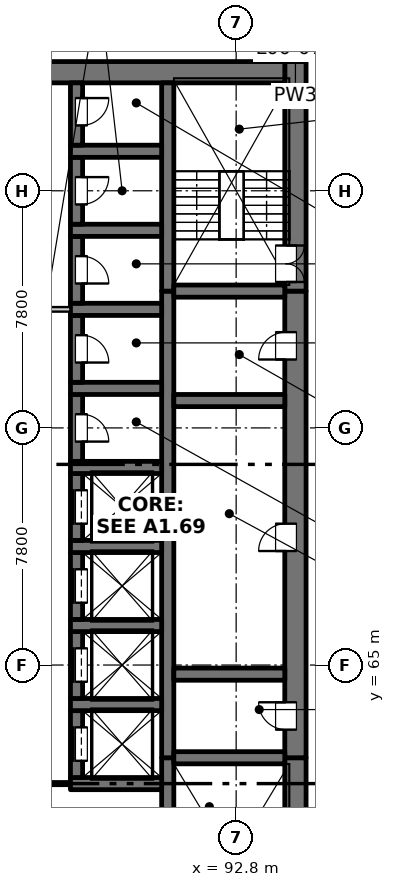
"""IFC4 building model, lengths in metres.
Left out: names, types, materials, properties, quantities, classifications, styles, units other than length and angle.
Written with IfcOpenShell. Run it as: python <this file> out.ifc"""

import sys

from ifc_helpers import new_model, si_unit, direction, frame, frame_2d, origin, place, context, subcontext, project, spatial, rectangle, extrude, element, fill, save


model = new_model("IFC4")
c1 = context("Model", 3, precision=1e-05, world=origin(), true_north=direction((0.0, 1.0)))
c2 = subcontext(c1, "Body", "Model", "MODEL_VIEW")
j1 = project(units=[si_unit("LENGTHUNIT", "METRE"), si_unit("PLANEANGLEUNIT", "RADIAN")], contexts=[c1])
p1 = place(None, origin())
s1 = spatial("IfcSite", under=j1, at=p1, CompositionType="ELEMENT")
p2 = place(p1, origin())
s2 = spatial("IfcBuilding", under=s1, at=p2, CompositionType="ELEMENT")
p3 = place(p2, origin())
s3 = spatial("IfcBuildingStorey", under=s2, at=p3, CompositionType="ELEMENT", Elevation=0.0)
p4 = place(p3, frame((94.75, 54.9, -0.4), z_axis=(0.0, 0.0, 1.0), x_axis=(0.0, 1.0, 0.0)))
e1 = element("IfcWall", 1, at=p4, inside=s3, PredefinedType="SOLIDWALL", context=c2, shape_type="SweptSolid", body=[
    extrude(rectangle(XDim=7.05, YDim=0.7, at=frame_2d((3.525, 0.0))), origin(), (0.0, 0.0, 1.0), 6.1),
])
p5 = place(p4, frame((0.75, 0.0, 0.4)))
e2 = element("IfcOpeningElement", 2, at=p5, cuts=e1, PredefinedType="OPENING", context=c2, shape_type="SweptSolid", body=[
    extrude(rectangle(XDim=1.2, YDim=2.1, at=frame_2d((0.6, 1.05))), frame((0.0, 0.36, 0.0), z_axis=(0.0, -1.0, 0.0), x_axis=(1.0, 0.0, 0.0)), (0.0, 0.0, 1.0), 0.72),
])
p6 = place(p3, frame((94.75, 61.95, -0.4), z_axis=(0.0, 0.0, 1.0), x_axis=(0.0, 1.0, 0.0)))
e3 = element("IfcWall", 3, at=p6, inside=s3, PredefinedType="SOLIDWALL", context=c2, shape_type="SweptSolid", body=[
    extrude(rectangle(XDim=15.35, YDim=0.7, at=frame_2d((7.675, 0.0))), origin(), (0.0, 0.0, 1.0), 6.1),
])
p7 = place(p6, frame((0.925, 0.0, 0.4)))
e4 = element("IfcOpeningElement", 4, at=p7, cuts=e3, PredefinedType="OPENING", context=c2, shape_type="SweptSolid", body=[
    extrude(rectangle(XDim=0.9, YDim=2.1, at=frame_2d((0.45, 1.05))), frame((0.0, 0.36, 0.0), z_axis=(0.0, -1.0, 0.0), x_axis=(1.0, 0.0, 0.0)), (0.0, 0.0, 1.0), 0.72),
])
p8 = place(p6, frame((6.8, 0.0, 0.4)))
e5 = element("IfcOpeningElement", 5, at=p8, cuts=e3, PredefinedType="OPENING", context=c2, shape_type="SweptSolid", body=[
    extrude(rectangle(XDim=0.9, YDim=2.1, at=frame_2d((0.45, 1.05))), frame((0.0, 0.36, 0.0), z_axis=(0.0, -1.0, 0.0), x_axis=(1.0, 0.0, 0.0)), (0.0, 0.0, 1.0), 0.72),
])
p9 = place(p6, frame((13.1, 0.0, 0.4)))
e6 = element("IfcOpeningElement", 6, at=p9, cuts=e3, PredefinedType="OPENING", context=c2, shape_type="SweptSolid", body=[
    extrude(rectangle(XDim=0.9, YDim=2.1, at=frame_2d((0.45, 1.05))), frame((0.0, 0.36, 0.0), z_axis=(0.0, -1.0, 0.0), x_axis=(1.0, 0.0, 0.0)), (0.0, 0.0, 1.0), 0.72),
])
p10 = place(p3, frame((94.75, 77.3, -0.4), z_axis=(0.0, 0.0, 1.0), x_axis=(0.0, 1.0, 0.0)))
e7 = element("IfcWall", 7, at=p10, inside=s3, PredefinedType="SOLIDWALL", context=c2, shape_type="SweptSolid", body=[
    extrude(rectangle(XDim=7.55, YDim=0.7, at=frame_2d((3.775, 0.0))), origin(), (0.0, 0.0, 1.0), 6.1),
])
p11 = place(p10, frame((0.3, 0.0, 0.4)))
e8 = element("IfcOpeningElement", 8, at=p11, cuts=e7, PredefinedType="OPENING", context=c2, shape_type="SweptSolid", body=[
    extrude(rectangle(XDim=1.2, YDim=2.1, at=frame_2d((0.6, 1.05))), frame((0.0, 0.36, 0.0), z_axis=(0.0, -1.0, 0.0), x_axis=(1.0, 0.0, 0.0)), (0.0, 0.0, 1.0), 0.72),
])
p12 = place(p3, frame((75.6, 84.5, -0.4), z_axis=(0.0, 0.0, 1.0), x_axis=(1.0, 0.0, 0.0)))
e9 = element("IfcWall", 9, at=p12, inside=s3, PredefinedType="SOLIDWALL", context=c2, shape_type="SweptSolid", body=[
    extrude(rectangle(XDim=18.8, YDim=0.7, at=frame_2d((9.4, 0.0))), origin(), (0.0, 0.0, 1.0), 6.1),
])
p13 = place(p3, frame((90.55, 55.6, -0.4), z_axis=(0.0, 0.0, 1.0), x_axis=(0.0, 1.0, 0.0)))
e10 = element("IfcWall", 10, at=p13, inside=s3, PredefinedType="SOLIDWALL", context=c2, shape_type="SweptSolid", body=[
    extrude(rectangle(XDim=6.35, YDim=0.4, at=frame_2d((3.175, 0.0))), origin(), (0.0, 0.0, 1.0), 6.1),
])
p14 = place(p13, frame((0.1, 0.0, 0.4)))
e11 = element("IfcOpeningElement", 11, at=p14, cuts=e10, PredefinedType="OPENING", context=c2, shape_type="SweptSolid", body=[
    extrude(rectangle(XDim=1.2, YDim=2.1, at=frame_2d((0.6, 1.05))), frame((0.0, 0.21, 0.0), z_axis=(0.0, -1.0, 0.0), x_axis=(1.0, 0.0, 0.0)), (0.0, 0.0, 1.0), 0.42),
])
p15 = place(p3, frame((90.55, 61.95, -0.4), z_axis=(0.0, 0.0, 1.0), x_axis=(0.0, 1.0, 0.0)))
e12 = element("IfcWall", 12, at=p15, inside=s3, PredefinedType="SOLIDWALL", context=c2, shape_type="SweptSolid", body=[
    extrude(rectangle(XDim=15.35, YDim=0.4, at=frame_2d((7.675, 0.0))), origin(), (0.0, 0.0, 1.0), 6.1),
])
p16 = place(p3, frame((90.55, 77.3, -0.4), z_axis=(0.0, 0.0, 1.0), x_axis=(0.0, 1.0, 0.0)))
e13 = element("IfcWall", 13, at=p16, inside=s3, PredefinedType="SOLIDWALL", context=c2, shape_type="SweptSolid", body=[
    extrude(rectangle(XDim=6.85, YDim=0.4, at=frame_2d((3.425, 0.0))), origin(), (0.0, 0.0, 1.0), 6.1),
])
p17 = place(p3, frame((87.35, 61.1, -0.4), z_axis=(0.0, 0.0, 1.0), x_axis=(1.0, 0.0, 0.0)))
e14 = element("IfcWall", 14, at=p17, inside=s3, PredefinedType="SOLIDWALL", context=c2, shape_type="SweptSolid", body=[
    extrude(rectangle(XDim=3.0, YDim=0.4, at=frame_2d((1.5, 0.0))), origin(), (0.0, 0.0, 1.0), 6.1),
])
p18 = place(p3, frame((87.55, 61.3, -0.4), z_axis=(0.0, 0.0, 1.0), x_axis=(0.0, 1.0, 0.0)))
e15 = element("IfcWall", 15, at=p18, inside=s3, PredefinedType="SOLIDWALL", context=c2, shape_type="SweptSolid", body=[
    extrude(rectangle(XDim=2.2, YDim=0.4, at=frame_2d((1.1, 0.0))), origin(), (0.0, 0.0, 1.0), 6.1),
])
p19 = place(p18, frame((0.55, 0.0, 0.4)))
e16 = element("IfcOpeningElement", 16, at=p19, cuts=e15, PredefinedType="OPENING", context=c2, shape_type="SweptSolid", body=[
    extrude(rectangle(XDim=1.1, YDim=2.1, at=frame_2d((0.55, 1.05))), frame((0.0, 0.21, 0.0), z_axis=(0.0, -1.0, 0.0), x_axis=(1.0, 0.0, 0.0)), (0.0, 0.0, 1.0), 0.42),
])
p20 = place(p3, frame((87.35, 63.7, -0.4), z_axis=(0.0, 0.0, 1.0), x_axis=(1.0, 0.0, 0.0)))
e17 = element("IfcWall", 17, at=p20, inside=s3, PredefinedType="SOLIDWALL", context=c2, shape_type="SweptSolid", body=[
    extrude(rectangle(XDim=3.0, YDim=0.4, at=frame_2d((1.5, 0.0))), origin(), (0.0, 0.0, 1.0), 6.1),
])
p21 = place(p3, frame((87.55, 63.9, -0.4), z_axis=(0.0, 0.0, 1.0), x_axis=(0.0, 1.0, 0.0)))
e18 = element("IfcWall", 18, at=p21, inside=s3, PredefinedType="SOLIDWALL", context=c2, shape_type="SweptSolid", body=[
    extrude(rectangle(XDim=2.2, YDim=0.4, at=frame_2d((1.1, 0.0))), origin(), (0.0, 0.0, 1.0), 6.1),
])
p22 = place(p21, frame((0.55, 0.0, 0.4)))
e19 = element("IfcOpeningElement", 19, at=p22, cuts=e18, PredefinedType="OPENING", context=c2, shape_type="SweptSolid", body=[
    extrude(rectangle(XDim=1.1, YDim=2.1, at=frame_2d((0.55, 1.05))), frame((0.0, 0.21, 0.0), z_axis=(0.0, -1.0, 0.0), x_axis=(1.0, 0.0, 0.0)), (0.0, 0.0, 1.0), 0.42),
])
p23 = place(p3, frame((87.35, 66.3, -0.4), z_axis=(0.0, 0.0, 1.0), x_axis=(1.0, 0.0, 0.0)))
e20 = element("IfcWall", 20, at=p23, inside=s3, PredefinedType="SOLIDWALL", context=c2, shape_type="SweptSolid", body=[
    extrude(rectangle(XDim=3.0, YDim=0.4, at=frame_2d((1.5, 0.0))), origin(), (0.0, 0.0, 1.0), 6.1),
])
p24 = place(p3, frame((87.55, 66.5, -0.4), z_axis=(0.0, 0.0, 1.0), x_axis=(0.0, 1.0, 0.0)))
e21 = element("IfcWall", 21, at=p24, inside=s3, PredefinedType="SOLIDWALL", context=c2, shape_type="SweptSolid", body=[
    extrude(rectangle(XDim=2.2, YDim=0.4, at=frame_2d((1.1, 0.0))), origin(), (0.0, 0.0, 1.0), 6.1),
])
p25 = place(p24, frame((0.55, 0.0, 0.4)))
e22 = element("IfcOpeningElement", 22, at=p25, cuts=e21, PredefinedType="OPENING", context=c2, shape_type="SweptSolid", body=[
    extrude(rectangle(XDim=1.1, YDim=2.1, at=frame_2d((0.55, 1.05))), frame((0.0, 0.21, 0.0), z_axis=(0.0, -1.0, 0.0), x_axis=(1.0, 0.0, 0.0)), (0.0, 0.0, 1.0), 0.42),
])
p26 = place(p3, frame((87.35, 68.9, -0.4), z_axis=(0.0, 0.0, 1.0), x_axis=(1.0, 0.0, 0.0)))
e23 = element("IfcWall", 23, at=p26, inside=s3, PredefinedType="SOLIDWALL", context=c2, shape_type="SweptSolid", body=[
    extrude(rectangle(XDim=3.0, YDim=0.4, at=frame_2d((1.5, 0.0))), origin(), (0.0, 0.0, 1.0), 6.1),
])
p27 = place(p3, frame((87.55, 69.1, -0.4), z_axis=(0.0, 0.0, 1.0), x_axis=(0.0, 1.0, 0.0)))
e24 = element("IfcWall", 24, at=p27, inside=s3, PredefinedType="SOLIDWALL", context=c2, shape_type="SweptSolid", body=[
    extrude(rectangle(XDim=2.2, YDim=0.4, at=frame_2d((1.1, 0.0))), origin(), (0.0, 0.0, 1.0), 6.1),
])
p28 = place(p27, frame((0.55, 0.0, 0.4)))
e25 = element("IfcOpeningElement", 25, at=p28, cuts=e24, PredefinedType="OPENING", context=c2, shape_type="SweptSolid", body=[
    extrude(rectangle(XDim=1.1, YDim=2.1, at=frame_2d((0.55, 1.05))), frame((0.0, 0.21, 0.0), z_axis=(0.0, -1.0, 0.0), x_axis=(1.0, 0.0, 0.0)), (0.0, 0.0, 1.0), 0.42),
])
p29 = place(p3, frame((87.35, 71.5, -0.4), z_axis=(0.0, 0.0, 1.0), x_axis=(1.0, 0.0, 0.0)))
e26 = element("IfcWall", 26, at=p29, inside=s3, PredefinedType="SOLIDWALL", context=c2, shape_type="SweptSolid", body=[
    extrude(rectangle(XDim=3.0, YDim=0.4, at=frame_2d((1.5, 0.0))), origin(), (0.0, 0.0, 1.0), 6.1),
])
p30 = place(p3, frame((87.55, 71.7, -0.4), z_axis=(0.0, 0.0, 1.0), x_axis=(0.0, 1.0, 0.0)))
e27 = element("IfcWall", 27, at=p30, inside=s3, PredefinedType="SOLIDWALL", context=c2, shape_type="SweptSolid", body=[
    extrude(rectangle(XDim=2.2, YDim=0.4, at=frame_2d((1.1, 0.0))), origin(), (0.0, 0.0, 1.0), 6.1),
])
p31 = place(p30, frame((0.65, 0.0, 0.4)))
e28 = element("IfcOpeningElement", 28, at=p31, cuts=e27, PredefinedType="OPENING", context=c2, shape_type="SweptSolid", body=[
    extrude(rectangle(XDim=0.9, YDim=2.1, at=frame_2d((0.45, 1.05))), frame((0.0, 0.21, 0.0), z_axis=(0.0, -1.0, 0.0), x_axis=(1.0, 0.0, 0.0)), (0.0, 0.0, 1.0), 0.42),
])
p32 = place(p3, frame((87.35, 74.1, -0.4), z_axis=(0.0, 0.0, 1.0), x_axis=(1.0, 0.0, 0.0)))
e29 = element("IfcWall", 29, at=p32, inside=s3, PredefinedType="SOLIDWALL", context=c2, shape_type="SweptSolid", body=[
    extrude(rectangle(XDim=3.0, YDim=0.4, at=frame_2d((1.5, 0.0))), origin(), (0.0, 0.0, 1.0), 6.1),
])
p33 = place(p3, frame((87.55, 74.3, -0.4), z_axis=(0.0, 0.0, 1.0), x_axis=(0.0, 1.0, 0.0)))
e30 = element("IfcWall", 30, at=p33, inside=s3, PredefinedType="SOLIDWALL", context=c2, shape_type="SweptSolid", body=[
    extrude(rectangle(XDim=2.2, YDim=0.4, at=frame_2d((1.1, 0.0))), origin(), (0.0, 0.0, 1.0), 6.1),
])
p34 = place(p33, frame((0.65, 0.0, 0.4)))
e31 = element("IfcOpeningElement", 31, at=p34, cuts=e30, PredefinedType="OPENING", context=c2, shape_type="SweptSolid", body=[
    extrude(rectangle(XDim=0.9, YDim=2.1, at=frame_2d((0.45, 1.05))), frame((0.0, 0.21, 0.0), z_axis=(0.0, -1.0, 0.0), x_axis=(1.0, 0.0, 0.0)), (0.0, 0.0, 1.0), 0.42),
])
p35 = place(p3, frame((87.35, 76.7, -0.4), z_axis=(0.0, 0.0, 1.0), x_axis=(1.0, 0.0, 0.0)))
e32 = element("IfcWall", 32, at=p35, inside=s3, PredefinedType="SOLIDWALL", context=c2, shape_type="SweptSolid", body=[
    extrude(rectangle(XDim=3.0, YDim=0.4, at=frame_2d((1.5, 0.0))), origin(), (0.0, 0.0, 1.0), 6.1),
])
p36 = place(p3, frame((87.55, 76.9, -0.4), z_axis=(0.0, 0.0, 1.0), x_axis=(0.0, 1.0, 0.0)))
e33 = element("IfcWall", 33, at=p36, inside=s3, PredefinedType="SOLIDWALL", context=c2, shape_type="SweptSolid", body=[
    extrude(rectangle(XDim=2.2, YDim=0.4, at=frame_2d((1.1, 0.0))), origin(), (0.0, 0.0, 1.0), 6.1),
])
p37 = place(p36, frame((0.65, 0.0, 0.4)))
e34 = element("IfcOpeningElement", 34, at=p37, cuts=e33, PredefinedType="OPENING", context=c2, shape_type="SweptSolid", body=[
    extrude(rectangle(XDim=0.9, YDim=2.1, at=frame_2d((0.45, 1.05))), frame((0.0, 0.21, 0.0), z_axis=(0.0, -1.0, 0.0), x_axis=(1.0, 0.0, 0.0)), (0.0, 0.0, 1.0), 0.42),
])
p38 = place(p3, frame((87.35, 79.3, -0.4), z_axis=(0.0, 0.0, 1.0), x_axis=(1.0, 0.0, 0.0)))
e35 = element("IfcWall", 35, at=p38, inside=s3, PredefinedType="SOLIDWALL", context=c2, shape_type="SweptSolid", body=[
    extrude(rectangle(XDim=3.0, YDim=0.4, at=frame_2d((1.5, 0.0))), origin(), (0.0, 0.0, 1.0), 6.1),
])
p39 = place(p3, frame((87.55, 79.5, -0.4), z_axis=(0.0, 0.0, 1.0), x_axis=(0.0, 1.0, 0.0)))
e36 = element("IfcWall", 36, at=p39, inside=s3, PredefinedType="SOLIDWALL", context=c2, shape_type="SweptSolid", body=[
    extrude(rectangle(XDim=2.2, YDim=0.4, at=frame_2d((1.1, 0.0))), origin(), (0.0, 0.0, 1.0), 6.1),
])
p40 = place(p39, frame((0.65, 0.0, 0.4)))
e37 = element("IfcOpeningElement", 37, at=p40, cuts=e36, PredefinedType="OPENING", context=c2, shape_type="SweptSolid", body=[
    extrude(rectangle(XDim=0.9, YDim=2.1, at=frame_2d((0.45, 1.05))), frame((0.0, 0.21, 0.0), z_axis=(0.0, -1.0, 0.0), x_axis=(1.0, 0.0, 0.0)), (0.0, 0.0, 1.0), 0.42),
])
p41 = place(p3, frame((87.35, 81.9, -0.4), z_axis=(0.0, 0.0, 1.0), x_axis=(1.0, 0.0, 0.0)))
e38 = element("IfcWall", 38, at=p41, inside=s3, PredefinedType="SOLIDWALL", context=c2, shape_type="SweptSolid", body=[
    extrude(rectangle(XDim=3.0, YDim=0.4, at=frame_2d((1.5, 0.0))), origin(), (0.0, 0.0, 1.0), 6.1),
])
p42 = place(p3, frame((87.55, 82.1, -0.4), z_axis=(0.0, 0.0, 1.0), x_axis=(0.0, 1.0, 0.0)))
e39 = element("IfcWall", 39, at=p42, inside=s3, PredefinedType="SOLIDWALL", context=c2, shape_type="SweptSolid", body=[
    extrude(rectangle(XDim=2.05, YDim=0.4, at=frame_2d((1.025, 0.0))), origin(), (0.0, 0.0, 1.0), 6.1),
])
p43 = place(p42, frame((0.65, 0.0, 0.4)))
e40 = element("IfcOpeningElement", 40, at=p43, cuts=e39, PredefinedType="OPENING", context=c2, shape_type="SweptSolid", body=[
    extrude(rectangle(XDim=0.9, YDim=2.1, at=frame_2d((0.45, 1.05))), frame((0.0, 0.21, 0.0), z_axis=(0.0, -1.0, 0.0), x_axis=(1.0, 0.0, 0.0)), (0.0, 0.0, 1.0), 0.42),
])
for number, where, z_axis, x_axis in (
    (41, (90.75, 61.95, -0.4), (0.0, 0.0, 1.0), (1.0, 0.0, 0.0)),
    (42, (90.75, 64.7, -0.4), (0.0, 0.0, 1.0), (1.0, 0.0, 0.0)),
    (43, (90.75, 73.7, -0.4), (0.0, 0.0, 1.0), (1.0, 0.0, 0.0)),
    (44, (90.75, 77.3, -0.4), (0.0, 0.0, 1.0), (1.0, 0.0, 0.0)),
):
    element("IfcWall", number, at=place(p3, frame(where, z_axis=z_axis, x_axis=x_axis)), inside=s3, PredefinedType="SOLIDWALL", context=c2, shape_type="SweptSolid", body=[
        extrude(rectangle(XDim=3.65, YDim=0.4, at=frame_2d((1.825, 0.0))), origin(), (0.0, 0.0, 1.0), 6.1),
    ])
p44 = place(p3, frame((82.65, 61.1, 0.0), z_axis=(0.0, 0.0, 1.0), x_axis=(1.0, 0.0, 0.0)))
e45 = element("IfcWall", 45, at=p44, inside=s3, PredefinedType="PARTITIONING", context=c2, shape_type="SweptSolid", body=[
    extrude(rectangle(XDim=4.7, YDim=0.15, at=frame_2d((2.35, 0.0))), origin(), (0.0, 0.0, 1.0), 5.7),
])
p45 = place(p44, frame((1.45, 0.0, 0.0)))
e46 = element("IfcOpeningElement", 46, at=p45, cuts=e45, PredefinedType="OPENING", context=c2, shape_type="SweptSolid", body=[
    extrude(rectangle(XDim=1.8, YDim=2.1, at=frame_2d((0.9, 1.05))), frame((0.0, 0.085, 0.0), z_axis=(0.0, -1.0, 0.0), x_axis=(1.0, 0.0, 0.0)), (0.0, 0.0, 1.0), 0.17),
])
p46 = place(p3, frame((82.65, 76.7, 0.0), z_axis=(0.0, 0.0, 1.0), x_axis=(1.0, 0.0, 0.0)))
e47 = element("IfcWall", 47, at=p46, inside=s3, PredefinedType="PARTITIONING", context=c2, shape_type="SweptSolid", body=[
    extrude(rectangle(XDim=4.7, YDim=0.15, at=frame_2d((2.35, 0.0))), origin(), (0.0, 0.0, 1.0), 5.7),
])
p47 = place(p46, frame((1.45, 0.0, 0.0)))
e48 = element("IfcOpeningElement", 48, at=p47, cuts=e47, PredefinedType="OPENING", context=c2, shape_type="SweptSolid", body=[
    extrude(rectangle(XDim=1.8, YDim=2.1, at=frame_2d((0.9, 1.05))), frame((0.0, 0.085, 0.0), z_axis=(0.0, -1.0, 0.0), x_axis=(1.0, 0.0, 0.0)), (0.0, 0.0, 1.0), 0.17),
])
p48 = place(p3, frame((94.75, 84.85, 0.0), z_axis=(0.0, 0.0, 1.0), x_axis=(0.0, 1.0, 0.0)))
e49 = element("IfcWall", 49, at=p48, inside=s3, PredefinedType="PARTITIONING", context=c2, shape_type="SweptSolid", body=[
    extrude(rectangle(XDim=3.25, YDim=0.2, at=frame_2d((1.625, 0.0))), origin(), (0.0, 0.0, 1.0), 5.7),
])
p49 = place(p48, frame((1.0, 0.0, 0.0)))
e50 = element("IfcOpeningElement", 50, at=p49, cuts=e49, PredefinedType="OPENING", context=c2, shape_type="SweptSolid", body=[
    extrude(rectangle(XDim=1.2, YDim=2.1, at=frame_2d((0.6, 1.05))), frame((0.0, 0.11, 0.0), z_axis=(0.0, -1.0, 0.0), x_axis=(1.0, 0.0, 0.0)), (0.0, 0.0, 1.0), 0.22),
])
p50 = place(p19, origin())
e51 = element("IfcDoor", 51, at=p50, inside=s3, OperationType="SLIDING_TO_RIGHT", PredefinedType="DOOR", context=c2, shape_type="SweptSolid", body=[
    extrude(rectangle(XDim=1.1, YDim=2.1, at=frame_2d((0.55, 1.05))), frame((0.0, -0.135, 0.0), z_axis=(0.0, -1.0, 0.0), x_axis=(1.0, 0.0, 0.0)), (0.0, 0.0, 1.0), 0.05),
])
fill(e16, e51)
p51 = place(p7, origin())
e52 = element("IfcDoor", 52, at=p51, inside=s3, OperationType="SINGLE_SWING_RIGHT", PredefinedType="DOOR", context=c2, shape_type="SweptSolid", body=[
    extrude(rectangle(XDim=0.9, YDim=2.1, at=frame_2d((0.45, 1.05))), frame((0.0, 0.335, 0.0), z_axis=(0.0, -1.0, 0.0), x_axis=(1.0, 0.0, 0.0)), (0.0, 0.0, 1.0), 0.05),
])
fill(e4, e52)
p52 = place(p22, origin())
e53 = element("IfcDoor", 53, at=p52, inside=s3, OperationType="SLIDING_TO_RIGHT", PredefinedType="DOOR", context=c2, shape_type="SweptSolid", body=[
    extrude(rectangle(XDim=1.1, YDim=2.1, at=frame_2d((0.55, 1.05))), frame((0.0, -0.135, 0.0), z_axis=(0.0, -1.0, 0.0), x_axis=(1.0, 0.0, 0.0)), (0.0, 0.0, 1.0), 0.05),
])
fill(e19, e53)
p53 = place(p25, origin())
e54 = element("IfcDoor", 54, at=p53, inside=s3, OperationType="SLIDING_TO_RIGHT", PredefinedType="DOOR", context=c2, shape_type="SweptSolid", body=[
    extrude(rectangle(XDim=1.1, YDim=2.1, at=frame_2d((0.55, 1.05))), frame((0.0, -0.135, 0.0), z_axis=(0.0, -1.0, 0.0), x_axis=(1.0, 0.0, 0.0)), (0.0, 0.0, 1.0), 0.05),
])
fill(e22, e54)
p54 = place(p8, origin())
e55 = element("IfcDoor", 55, at=p54, inside=s3, OperationType="SINGLE_SWING_LEFT", PredefinedType="DOOR", context=c2, shape_type="SweptSolid", body=[
    extrude(rectangle(XDim=0.9, YDim=2.1, at=frame_2d((0.45, 1.05))), frame((0.0, 0.335, 0.0), z_axis=(0.0, -1.0, 0.0), x_axis=(1.0, 0.0, 0.0)), (0.0, 0.0, 1.0), 0.05),
])
fill(e5, e55)
p55 = place(p28, origin())
e56 = element("IfcDoor", 56, at=p55, inside=s3, OperationType="SLIDING_TO_LEFT", PredefinedType="DOOR", context=c2, shape_type="SweptSolid", body=[
    extrude(rectangle(XDim=1.1, YDim=2.1, at=frame_2d((0.55, 1.05))), frame((0.0, -0.135, 0.0), z_axis=(0.0, -1.0, 0.0), x_axis=(1.0, 0.0, 0.0)), (0.0, 0.0, 1.0), 0.05),
])
fill(e25, e56)
p56 = place(p31, origin())
e57 = element("IfcDoor", 57, at=p56, inside=s3, OperationType="SINGLE_SWING_RIGHT", PredefinedType="DOOR", context=c2, shape_type="SweptSolid", body=[
    extrude(rectangle(XDim=0.9, YDim=2.1, at=frame_2d((0.45, 1.05))), frame((0.0, -0.135, 0.0), z_axis=(0.0, -1.0, 0.0), x_axis=(1.0, 0.0, 0.0)), (0.0, 0.0, 1.0), 0.05),
])
fill(e28, e57)
p57 = place(p34, origin())
e58 = element("IfcDoor", 58, at=p57, inside=s3, OperationType="SINGLE_SWING_RIGHT", PredefinedType="DOOR", context=c2, shape_type="SweptSolid", body=[
    extrude(rectangle(XDim=0.9, YDim=2.1, at=frame_2d((0.45, 1.05))), frame((0.0, -0.135, 0.0), z_axis=(0.0, -1.0, 0.0), x_axis=(1.0, 0.0, 0.0)), (0.0, 0.0, 1.0), 0.05),
])
fill(e31, e58)
p58 = place(p9, origin())
e59 = element("IfcDoor", 59, at=p58, inside=s3, OperationType="SINGLE_SWING_LEFT", PredefinedType="DOOR", context=c2, shape_type="SweptSolid", body=[
    extrude(rectangle(XDim=0.9, YDim=2.1, at=frame_2d((0.45, 1.05))), frame((0.0, 0.335, 0.0), z_axis=(0.0, -1.0, 0.0), x_axis=(1.0, 0.0, 0.0)), (0.0, 0.0, 1.0), 0.05),
])
fill(e6, e59)
p59 = place(p37, origin())
e60 = element("IfcDoor", 60, at=p59, inside=s3, OperationType="SINGLE_SWING_RIGHT", PredefinedType="DOOR", context=c2, shape_type="SweptSolid", body=[
    extrude(rectangle(XDim=0.9, YDim=2.1, at=frame_2d((0.45, 1.05))), frame((0.0, -0.135, 0.0), z_axis=(0.0, -1.0, 0.0), x_axis=(1.0, 0.0, 0.0)), (0.0, 0.0, 1.0), 0.05),
])
fill(e34, e60)
p60 = place(p11, frame((1.2, 0.0, 0.0), z_axis=(0.0, 0.0, 1.0), x_axis=(-1.0, 0.0, 0.0)))
e61 = element("IfcDoor", 61, at=p60, inside=s3, OperationType="DOUBLE_DOOR_SINGLE_SWING", PredefinedType="DOOR", context=c2, shape_type="SweptSolid", body=[
    extrude(rectangle(XDim=1.2, YDim=2.1, at=frame_2d((0.6, 1.05))), frame((0.0, -0.285, 0.0), z_axis=(0.0, -1.0, 0.0), x_axis=(1.0, 0.0, 0.0)), (0.0, 0.0, 1.0), 0.05),
])
fill(e8, e61)
p61 = place(p40, origin())
e62 = element("IfcDoor", 62, at=p61, inside=s3, OperationType="SINGLE_SWING_LEFT", PredefinedType="DOOR", context=c2, shape_type="SweptSolid", body=[
    extrude(rectangle(XDim=0.9, YDim=2.1, at=frame_2d((0.45, 1.05))), frame((0.0, -0.135, 0.0), z_axis=(0.0, -1.0, 0.0), x_axis=(1.0, 0.0, 0.0)), (0.0, 0.0, 1.0), 0.05),
])
fill(e37, e62)
p62 = place(p43, origin())
e63 = element("IfcDoor", 63, at=p62, inside=s3, OperationType="SINGLE_SWING_LEFT", PredefinedType="DOOR", context=c2, shape_type="SweptSolid", body=[
    extrude(rectangle(XDim=0.9, YDim=2.1, at=frame_2d((0.45, 1.05))), frame((0.0, -0.135, 0.0), z_axis=(0.0, -1.0, 0.0), x_axis=(1.0, 0.0, 0.0)), (0.0, 0.0, 1.0), 0.05),
])
fill(e40, e63)
save(model, sys.argv[1])
